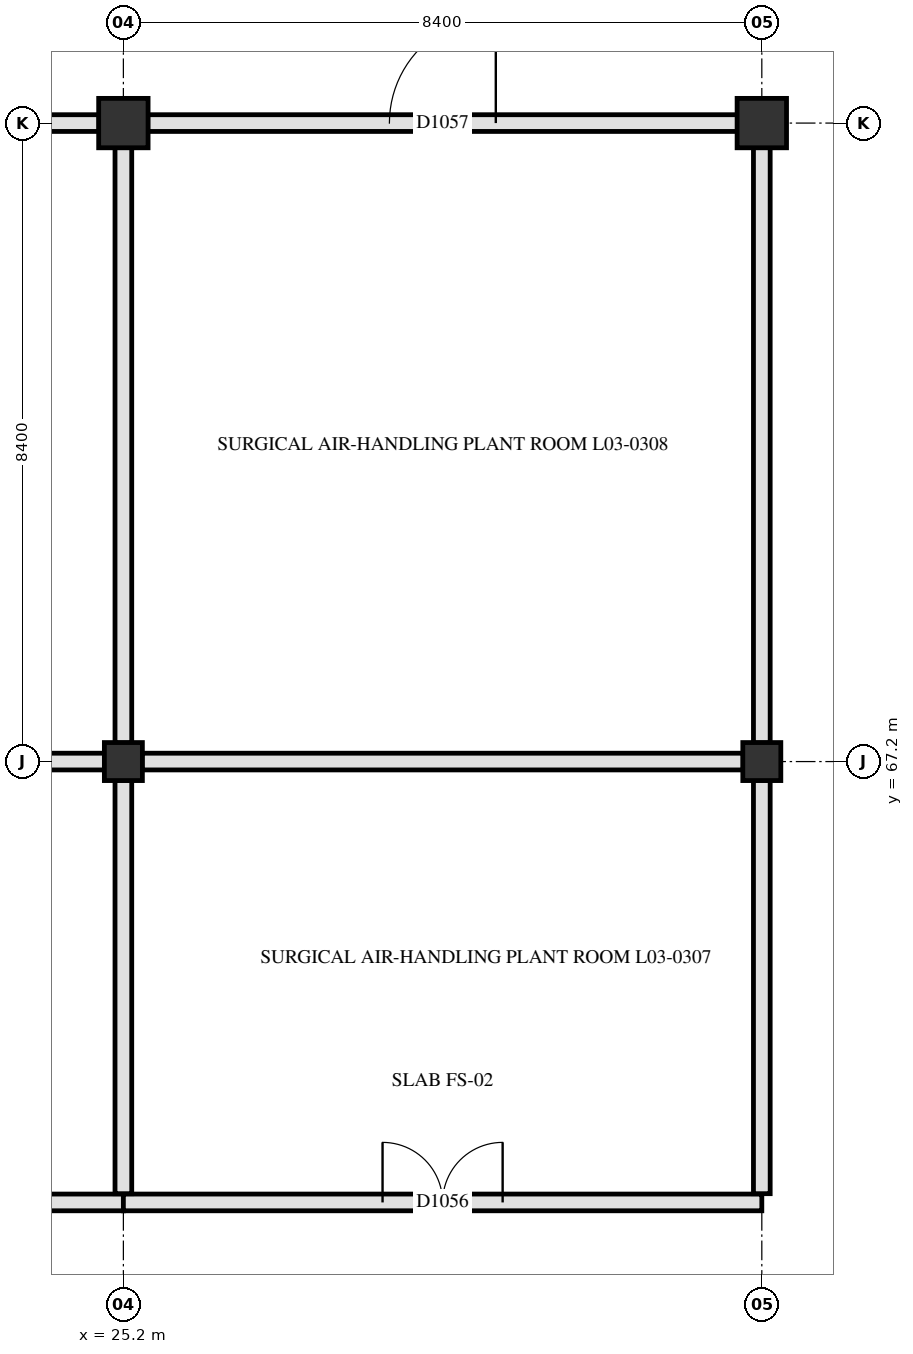
"""IFC4 building model, lengths in metres.
Left out: names, types, materials, properties, quantities, classifications, styles, units other than length and angle.
Written with IfcOpenShell. Run it as: python <this file> out.ifc"""

import sys

from ifc_helpers import new_model, si_unit, direction, frame, frame_2d, origin, origin_2d, place, context, subcontext, project, spatial, rectangle, circle, extrude, element, fill, save


model = new_model("IFC4")
c1 = context("Model", 3, precision=1e-05, world=origin(), true_north=direction((0.0, 1.0)))
c2 = subcontext(c1, "Body", "Model", "MODEL_VIEW")
j1 = project(units=[si_unit("LENGTHUNIT", "METRE"), si_unit("PLANEANGLEUNIT", "RADIAN")], contexts=[c1])
p1 = place(None, origin())
s1 = spatial("IfcSite", under=j1, at=p1, CompositionType="ELEMENT")
p2 = place(p1, origin())
s2 = spatial("IfcBuilding", under=s1, at=p2, CompositionType="ELEMENT")
p3 = place(p2, frame((0.0, 0.0, 14.4)))
s3 = spatial("IfcBuildingStorey", under=s2, at=p3, CompositionType="ELEMENT", Elevation=14.4)
p4 = place(p3, frame((25.2, 67.2, 0.0), z_axis=(0.0, 0.0, 1.0), x_axis=(1.0, 0.0, 0.0)))
e1 = element("IfcColumn", 1, at=p4, inside=s3, PredefinedType="COLUMN", context=c2, shape_type="SweptSolid", body=[
    extrude(rectangle(XDim=0.5, YDim=0.5, at=origin_2d()), origin(), (0.0, 0.0, 1.0), 4.2),
])
p5 = place(p3, frame((25.2, 75.6, 0.0), z_axis=(0.0, 0.0, 1.0), x_axis=(1.0, 0.0, 0.0)))
e2 = element("IfcColumn", 2, at=p5, inside=s3, PredefinedType="COLUMN", context=c2, shape_type="SweptSolid", body=[
    extrude(circle(Radius=0.325, at=origin_2d()), origin(), (0.0, 0.0, 1.0), 4.2),
])
p6 = place(p3, frame((33.6, 67.2, 0.0), z_axis=(0.0, 0.0, 1.0), x_axis=(1.0, 0.0, 0.0)))
e3 = element("IfcColumn", 3, at=p6, inside=s3, PredefinedType="COLUMN", context=c2, shape_type="SweptSolid", body=[
    extrude(rectangle(XDim=0.5, YDim=0.5, at=origin_2d()), origin(), (0.0, 0.0, 1.0), 4.2),
])
p7 = place(p3, frame((33.6, 75.6, 0.0), z_axis=(0.0, 0.0, 1.0), x_axis=(1.0, 0.0, 0.0)))
e4 = element("IfcColumn", 4, at=p7, inside=s3, PredefinedType="COLUMN", context=c2, shape_type="SweptSolid", body=[
    extrude(circle(Radius=0.325, at=origin_2d()), origin(), (0.0, 0.0, 1.0), 4.2),
])
p8 = place(p3, frame((16.8, 61.4, 0.0), z_axis=(0.0, 0.0, 1.0), x_axis=(1.0, 0.0, 0.0)))
e5 = element("IfcWall", 5, at=p8, inside=s3, PredefinedType="PARTITIONING", context=c2, shape_type="SweptSolid", body=[
    extrude(rectangle(XDim=8.4, YDim=0.22, at=frame_2d((4.2, 0.0))), origin(), (0.0, 0.0, 1.0), 3.33),
])
p9 = place(p8, frame((3.69, 0.0, 0.0)))
e6 = element("IfcOpeningElement", 6, at=p9, cuts=e5, PredefinedType="OPENING", context=c2, shape_type="SweptSolid", body=[
    extrude(rectangle(XDim=1.02, YDim=2.12, at=frame_2d((0.51, 1.06))), frame((0.0, 0.12, 0.0), z_axis=(0.0, -1.0, 0.0), x_axis=(1.0, 0.0, 0.0)), (0.0, 0.0, 1.0), 0.24),
])
p10 = place(p3, frame((25.2, 61.4, 0.0), z_axis=(0.0, 0.0, 1.0), x_axis=(1.0, 0.0, 0.0)))
e7 = element("IfcWall", 7, at=p10, inside=s3, PredefinedType="PARTITIONING", context=c2, shape_type="SweptSolid", body=[
    extrude(rectangle(XDim=8.4, YDim=0.22, at=frame_2d((4.2, 0.0))), origin(), (0.0, 0.0, 1.0), 3.33),
])
p11 = place(p10, frame((3.41, 0.0, 0.0)))
e8 = element("IfcOpeningElement", 8, at=p11, cuts=e7, PredefinedType="OPENING", context=c2, shape_type="SweptSolid", body=[
    extrude(rectangle(XDim=1.58, YDim=2.22, at=frame_2d((0.79, 1.11))), frame((0.0, 0.12, 0.0), z_axis=(0.0, -1.0, 0.0), x_axis=(1.0, 0.0, 0.0)), (0.0, 0.0, 1.0), 0.24),
])
p12 = place(p3, frame((17.045, 67.2, 0.0), z_axis=(0.0, 0.0, 1.0), x_axis=(1.0, 0.0, 0.0)))
e9 = element("IfcWall", 9, at=p12, inside=s3, PredefinedType="PARTITIONING", context=c2, shape_type="SweptSolid", body=[
    extrude(rectangle(XDim=7.91, YDim=0.22, at=frame_2d((3.955, 0.0))), origin(), (0.0, 0.0, 1.0), 3.28),
])
p13 = place(p3, frame((25.445, 67.2, 0.0), z_axis=(0.0, 0.0, 1.0), x_axis=(1.0, 0.0, 0.0)))
e10 = element("IfcWall", 10, at=p13, inside=s3, PredefinedType="PARTITIONING", context=c2, shape_type="SweptSolid", body=[
    extrude(rectangle(XDim=7.91, YDim=0.22, at=frame_2d((3.955, 0.0))), origin(), (0.0, 0.0, 1.0), 3.28),
])
p14 = place(p3, frame((17.12, 75.6, 0.0), z_axis=(0.0, 0.0, 1.0), x_axis=(1.0, 0.0, 0.0)))
e11 = element("IfcWall", 11, at=p14, inside=s3, PredefinedType="PARTITIONING", context=c2, shape_type="SweptSolid", body=[
    extrude(rectangle(XDim=7.76, YDim=0.22, at=frame_2d((3.88, 0.0))), origin(), (0.0, 0.0, 1.0), 3.28),
])
p15 = place(p14, frame((3.34, 0.0, 0.0)))
e12 = element("IfcOpeningElement", 12, at=p15, cuts=e11, PredefinedType="OPENING", context=c2, shape_type="SweptSolid", body=[
    extrude(rectangle(XDim=1.08, YDim=2.12, at=frame_2d((0.54, 1.06))), frame((0.0, 0.12, 0.0), z_axis=(0.0, -1.0, 0.0), x_axis=(1.0, 0.0, 0.0)), (0.0, 0.0, 1.0), 0.24),
])
p16 = place(p3, frame((25.52, 75.6, 0.0), z_axis=(0.0, 0.0, 1.0), x_axis=(1.0, 0.0, 0.0)))
e13 = element("IfcWall", 13, at=p16, inside=s3, PredefinedType="PARTITIONING", context=c2, shape_type="SweptSolid", body=[
    extrude(rectangle(XDim=7.76, YDim=0.22, at=frame_2d((3.88, 0.0))), origin(), (0.0, 0.0, 1.0), 3.28),
])
p17 = place(p16, frame((3.18, 0.0, 0.0)))
e14 = element("IfcOpeningElement", 14, at=p17, cuts=e13, PredefinedType="OPENING", context=c2, shape_type="SweptSolid", body=[
    extrude(rectangle(XDim=1.4, YDim=2.2, at=frame_2d((0.7, 1.1))), frame((0.0, 0.12, 0.0), z_axis=(0.0, -1.0, 0.0), x_axis=(1.0, 0.0, 0.0)), (0.0, 0.0, 1.0), 0.24),
])
p18 = place(p3, frame((25.2, 61.515, 0.0), z_axis=(0.0, 0.0, 1.0), x_axis=(0.0, 1.0, 0.0)))
e15 = element("IfcWall", 15, at=p18, inside=s3, PredefinedType="PARTITIONING", context=c2, shape_type="SweptSolid", body=[
    extrude(rectangle(XDim=5.44, YDim=0.22, at=frame_2d((2.72, 0.0))), origin(), (0.0, 0.0, 1.0), 3.33),
])
p19 = place(p3, frame((25.2, 67.445, 0.0), z_axis=(0.0, 0.0, 1.0), x_axis=(0.0, 1.0, 0.0)))
e16 = element("IfcWall", 16, at=p19, inside=s3, PredefinedType="PARTITIONING", context=c2, shape_type="SweptSolid", body=[
    extrude(rectangle(XDim=7.835, YDim=0.22, at=frame_2d((3.917, 0.0))), origin(), (0.0, 0.0, 1.0), 3.33),
])
p20 = place(p3, frame((33.6, 61.515, 0.0), z_axis=(0.0, 0.0, 1.0), x_axis=(0.0, 1.0, 0.0)))
e17 = element("IfcWall", 17, at=p20, inside=s3, PredefinedType="PARTITIONING", context=c2, shape_type="SweptSolid", body=[
    extrude(rectangle(XDim=5.44, YDim=0.22, at=frame_2d((2.72, 0.0))), origin(), (0.0, 0.0, 1.0), 3.33),
])
p21 = place(p3, frame((33.6, 67.445, 0.0), z_axis=(0.0, 0.0, 1.0), x_axis=(0.0, 1.0, 0.0)))
e18 = element("IfcWall", 18, at=p21, inside=s3, PredefinedType="PARTITIONING", context=c2, shape_type="SweptSolid", body=[
    extrude(rectangle(XDim=7.835, YDim=0.22, at=frame_2d((3.917, 0.0))), origin(), (0.0, 0.0, 1.0), 3.33),
])
p22 = place(p11, origin())
e19 = element("IfcDoor", 19, at=p22, inside=s3, OperationType="DOUBLE_SWING_LEFT", PredefinedType="DOOR", context=c2, shape_type="SweptSolid", body=[
    extrude(rectangle(XDim=1.58, YDim=2.22, at=frame_2d((0.79, 1.11))), frame((0.0, 0.025, 0.0), z_axis=(0.0, -1.0, 0.0), x_axis=(1.0, 0.0, 0.0)), (0.0, 0.0, 1.0), 0.05),
])
fill(e8, e19)
p23 = place(p17, origin())
e20 = element("IfcDoor", 20, at=p23, inside=s3, OperationType="SINGLE_SWING_RIGHT", PredefinedType="DOOR", context=c2, shape_type="SweptSolid", body=[
    extrude(rectangle(XDim=1.4, YDim=2.2, at=frame_2d((0.7, 1.1))), frame((0.0, 0.025, 0.0), z_axis=(0.0, -1.0, 0.0), x_axis=(1.0, 0.0, 0.0)), (0.0, 0.0, 1.0), 0.05),
])
fill(e14, e20)
save(model, sys.argv[1])
